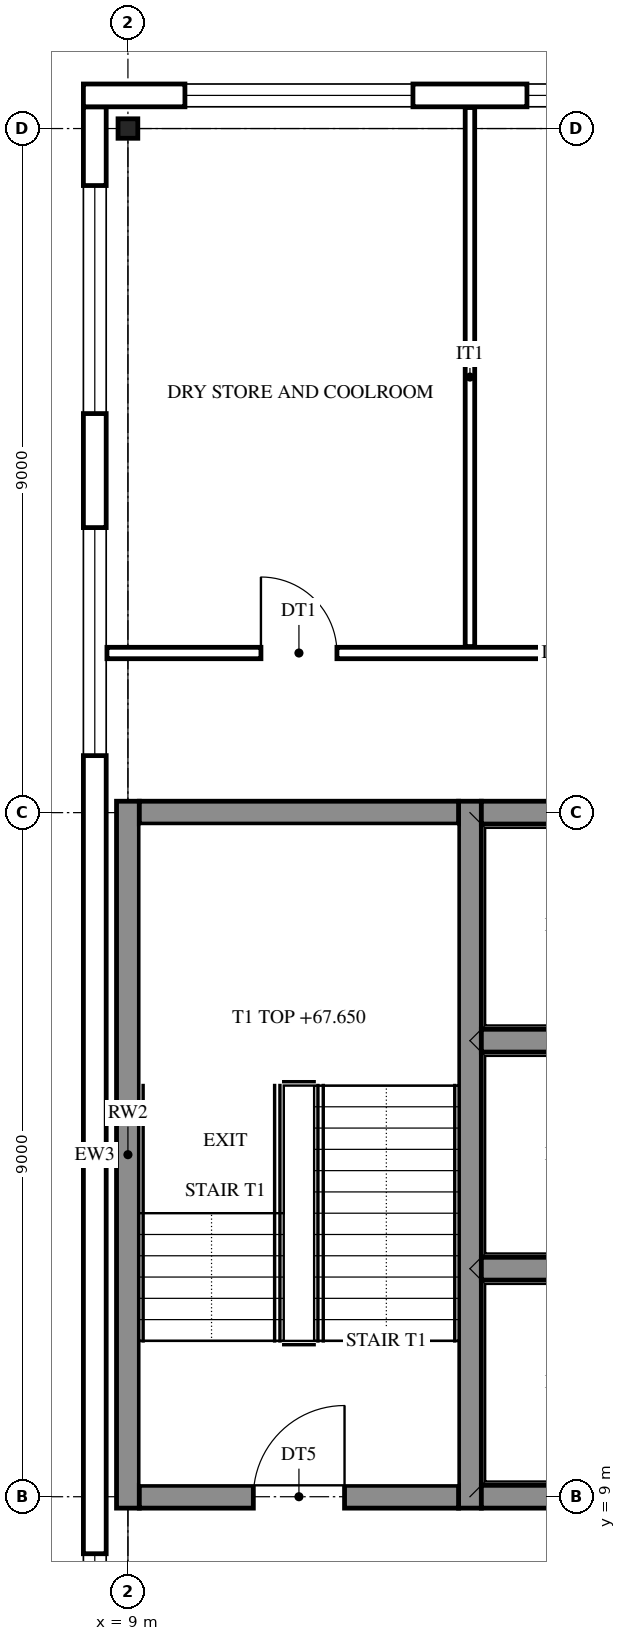
"""IFC4 building model, lengths in metres.
Left out: names, types, materials, properties, quantities, classifications, styles, units other than length and angle.
Written with IfcOpenShell. Run it as: python <this file> out.ifc"""

import sys

from ifc_helpers import new_model, si_unit, direction, frame, frame_2d, origin, origin_2d, place, context, subcontext, project, spatial, rectangle, i_section, extrude, element, fill, save


model = new_model("IFC4")
c1 = context("Model", 3, precision=1e-05, world=origin(), true_north=direction((0.0, 1.0)))
c2 = subcontext(c1, "Body", "Model", "MODEL_VIEW")
j1 = project(units=[si_unit("LENGTHUNIT", "METRE"), si_unit("PLANEANGLEUNIT", "RADIAN")], contexts=[c1])
p1 = place(None, origin())
s1 = spatial("IfcSite", under=j1, at=p1, CompositionType="ELEMENT")
p2 = place(p1, origin())
s2 = spatial("IfcBuilding", under=s1, at=p2, CompositionType="ELEMENT")
p3 = place(p2, frame((0.0, 0.0, 65.4)))
s3 = spatial("IfcBuildingStorey", under=s2, at=p3, CompositionType="ELEMENT", Elevation=65.4)
p4 = place(p3, frame((9.0, 27.0, 0.0), z_axis=(0.0, 0.0, 1.0), x_axis=(0.0, 1.0, 0.0)))
e1 = element("IfcColumn", 1, at=p4, inside=s3, PredefinedType="COLUMN", context=c2, shape_type="SweptSolid", body=[
    extrude(i_section(OverallWidth=0.256, OverallDepth=0.26, WebThickness=0.01, FlangeThickness=0.017, FilletRadius=0.014, at=origin_2d()), origin(), (0.0, 0.0, 1.0), 4.5),
])
for number, where, z_axis, x_axis in (
    (2, (9.0, 8.85, 0.0), (0.0, 0.0, 1.0), (0.0, 1.0, 0.0)),
    (3, (13.5, 8.85, 0.0), (0.0, 0.0, 1.0), (0.0, 1.0, 0.0)),
):
    element("IfcWall", number, at=place(p3, frame(where, z_axis=z_axis, x_axis=x_axis)), inside=s3, PredefinedType="SHEAR", context=c2, shape_type="SweptSolid", body=[
        extrude(rectangle(XDim=9.3, YDim=0.3, at=frame_2d((4.65, 0.0))), origin(), (0.0, 0.0, 1.0), 4.5),
    ])
p5 = place(p3, frame((9.15, 9.0, 0.0), z_axis=(0.0, 0.0, 1.0), x_axis=(1.0, 0.0, 0.0)))
e4 = element("IfcWall", 4, at=p5, inside=s3, PredefinedType="SHEAR", context=c2, shape_type="SweptSolid", body=[
    extrude(rectangle(XDim=4.2, YDim=0.3, at=frame_2d((2.1, 0.0))), origin(), (0.0, 0.0, 1.0), 4.5),
])
p6 = place(p5, frame((1.5, 0.0, 0.0)))
e5 = element("IfcOpeningElement", 5, at=p6, cuts=e4, PredefinedType="OPENING", context=c2, shape_type="SweptSolid", body=[
    extrude(rectangle(XDim=1.2, YDim=2.1, at=frame_2d((0.6, 1.05))), frame((0.0, 0.16, 0.0), z_axis=(0.0, -1.0, 0.0), x_axis=(1.0, 0.0, 0.0)), (0.0, 0.0, 1.0), 0.32),
])
for number, where, z_axis, x_axis in (
    (6, (13.65, 9.0, 0.0), (0.0, 0.0, 1.0), (1.0, 0.0, 0.0)),
    (7, (13.65, 12.0, 0.0), (0.0, 0.0, 1.0), (1.0, 0.0, 0.0)),
    (8, (13.65, 15.0, 0.0), (0.0, 0.0, 1.0), (1.0, 0.0, 0.0)),
):
    element("IfcWall", number, at=place(p3, frame(where, z_axis=z_axis, x_axis=x_axis)), inside=s3, PredefinedType="SHEAR", context=c2, shape_type="SweptSolid", body=[
        extrude(rectangle(XDim=2.7, YDim=0.3, at=frame_2d((1.35, 0.0))), origin(), (0.0, 0.0, 1.0), 4.5),
    ])
p7 = place(p3, frame((9.15, 18.0, 0.0), z_axis=(0.0, 0.0, 1.0), x_axis=(1.0, 0.0, 0.0)))
e9 = element("IfcWall", 9, at=p7, inside=s3, PredefinedType="SHEAR", context=c2, shape_type="SweptSolid", body=[
    extrude(rectangle(XDim=4.2, YDim=0.3, at=frame_2d((2.1, 0.0))), origin(), (0.0, 0.0, 1.0), 4.5),
])
p8 = place(p3, frame((13.65, 18.0, 0.0), z_axis=(0.0, 0.0, 1.0), x_axis=(1.0, 0.0, 0.0)))
e10 = element("IfcWall", 10, at=p8, inside=s3, PredefinedType="SHEAR", context=c2, shape_type="SweptSolid", body=[
    extrude(rectangle(XDim=2.7, YDim=0.3, at=frame_2d((1.35, 0.0))), origin(), (0.0, 0.0, 1.0), 4.5),
])
p9 = place(p3, frame((8.564, -0.286, 0.0), z_axis=(0.0, 0.0, 1.0), x_axis=(0.0, 1.0, 0.0)))
e11 = element("IfcWall", 11, at=p9, inside=s3, PredefinedType="STANDARD", context=c2, shape_type="SweptSolid", body=[
    extrude(rectangle(XDim=27.572, YDim=0.3, at=frame_2d((13.786, 0.0))), origin(), (0.0, 0.0, 1.0), 4.5),
])
p10 = place(p9, frame((1.036, 0.0, 0.6)))
e12 = element("IfcOpeningElement", 12, at=p10, cuts=e11, PredefinedType="OPENING", context=c2, shape_type="SweptSolid", body=[
    extrude(rectangle(XDim=3.0, YDim=3.1, at=frame_2d((1.5, 1.55))), frame((0.0, 0.16, 0.0), z_axis=(0.0, -1.0, 0.0), x_axis=(1.0, 0.0, 0.0)), (0.0, 0.0, 1.0), 0.32),
])
p11 = place(p9, frame((5.536, 0.0, 0.6)))
e13 = element("IfcOpeningElement", 13, at=p11, cuts=e11, PredefinedType="OPENING", context=c2, shape_type="SweptSolid", body=[
    extrude(rectangle(XDim=3.0, YDim=3.1, at=frame_2d((1.5, 1.55))), frame((0.0, 0.16, 0.0), z_axis=(0.0, -1.0, 0.0), x_axis=(1.0, 0.0, 0.0)), (0.0, 0.0, 1.0), 0.32),
])
p12 = place(p9, frame((19.036, 0.0, 0.6)))
e14 = element("IfcOpeningElement", 14, at=p12, cuts=e11, PredefinedType="OPENING", context=c2, shape_type="SweptSolid", body=[
    extrude(rectangle(XDim=3.0, YDim=3.1, at=frame_2d((1.5, 1.55))), frame((0.0, 0.16, 0.0), z_axis=(0.0, -1.0, 0.0), x_axis=(1.0, 0.0, 0.0)), (0.0, 0.0, 1.0), 0.32),
])
p13 = place(p9, frame((23.536, 0.0, 0.6)))
e15 = element("IfcOpeningElement", 15, at=p13, cuts=e11, PredefinedType="OPENING", context=c2, shape_type="SweptSolid", body=[
    extrude(rectangle(XDim=3.0, YDim=3.1, at=frame_2d((1.5, 1.55))), frame((0.0, 0.16, 0.0), z_axis=(0.0, -1.0, 0.0), x_axis=(1.0, 0.0, 0.0)), (0.0, 0.0, 1.0), 0.32),
])
p14 = place(p3, frame((8.414, 27.436, 0.0), z_axis=(0.0, 0.0, 1.0), x_axis=(1.0, 0.0, 0.0)))
e16 = element("IfcWall", 16, at=p14, inside=s3, PredefinedType="STANDARD", context=c2, shape_type="SweptSolid", body=[
    extrude(rectangle(XDim=19.172, YDim=0.3, at=frame_2d((9.586, 0.0))), origin(), (0.0, 0.0, 1.0), 4.5),
])
p15 = place(p14, frame((1.336, 0.0, 0.6)))
e17 = element("IfcOpeningElement", 17, at=p15, cuts=e16, PredefinedType="OPENING", context=c2, shape_type="SweptSolid", body=[
    extrude(rectangle(XDim=3.0, YDim=3.1, at=frame_2d((1.5, 1.55))), frame((0.0, 0.16, 0.0), z_axis=(0.0, -1.0, 0.0), x_axis=(1.0, 0.0, 0.0)), (0.0, 0.0, 1.0), 0.32),
])
p16 = place(p14, frame((5.836, 0.0, 0.6)))
e18 = element("IfcOpeningElement", 18, at=p16, cuts=e16, PredefinedType="OPENING", context=c2, shape_type="SweptSolid", body=[
    extrude(rectangle(XDim=3.0, YDim=3.1, at=frame_2d((1.5, 1.55))), frame((0.0, 0.16, 0.0), z_axis=(0.0, -1.0, 0.0), x_axis=(1.0, 0.0, 0.0)), (0.0, 0.0, 1.0), 0.32),
])
p17 = place(p14, frame((10.336, 0.0, 0.6)))
e19 = element("IfcOpeningElement", 19, at=p17, cuts=e16, PredefinedType="OPENING", context=c2, shape_type="SweptSolid", body=[
    extrude(rectangle(XDim=3.0, YDim=3.1, at=frame_2d((1.5, 1.55))), frame((0.0, 0.16, 0.0), z_axis=(0.0, -1.0, 0.0), x_axis=(1.0, 0.0, 0.0)), (0.0, 0.0, 1.0), 0.32),
])
p18 = place(p14, frame((14.836, 0.0, 0.6)))
e20 = element("IfcOpeningElement", 20, at=p18, cuts=e16, PredefinedType="OPENING", context=c2, shape_type="SweptSolid", body=[
    extrude(rectangle(XDim=3.0, YDim=3.1, at=frame_2d((1.5, 1.55))), frame((0.0, 0.16, 0.0), z_axis=(0.0, -1.0, 0.0), x_axis=(1.0, 0.0, 0.0)), (0.0, 0.0, 1.0), 0.32),
])
p19 = place(p3, frame((13.5, 20.185, 0.0), z_axis=(0.0, 0.0, 1.0), x_axis=(0.0, 1.0, 0.0)))
e21 = element("IfcWall", 21, at=p19, inside=s3, PredefinedType="PARTITIONING", context=c2, shape_type="SweptSolid", body=[
    extrude(rectangle(XDim=7.091, YDim=0.125, at=frame_2d((3.545, 0.0))), origin(), (0.0, 0.0, 1.0), 3.723),
])
p20 = place(p3, frame((8.724, 20.1, 0.0), z_axis=(0.0, 0.0, 1.0), x_axis=(1.0, 0.0, 0.0)))
e22 = element("IfcWall", 22, at=p20, inside=s3, PredefinedType="PARTITIONING", context=c2, shape_type="SweptSolid", body=[
    extrude(rectangle(XDim=18.552, YDim=0.15, at=frame_2d((9.276, 0.0))), origin(), (0.0, 0.0, 1.0), 3.723),
])
p21 = place(p20, frame((2.026, 0.0, 0.0)))
e23 = element("IfcOpeningElement", 23, at=p21, cuts=e22, PredefinedType="OPENING", context=c2, shape_type="SweptSolid", body=[
    extrude(rectangle(XDim=1.0, YDim=2.1, at=frame_2d((0.5, 1.05))), frame((0.0, 0.085, 0.0), z_axis=(0.0, -1.0, 0.0), x_axis=(1.0, 0.0, 0.0)), (0.0, 0.0, 1.0), 0.17),
])
p22 = place(p20, frame((8.776, 0.0, 0.0)))
e24 = element("IfcOpeningElement", 24, at=p22, cuts=e22, PredefinedType="OPENING", context=c2, shape_type="SweptSolid", body=[
    extrude(rectangle(XDim=1.0, YDim=2.1, at=frame_2d((0.5, 1.05))), frame((0.0, 0.085, 0.0), z_axis=(0.0, -1.0, 0.0), x_axis=(1.0, 0.0, 0.0)), (0.0, 0.0, 1.0), 0.17),
])
p23 = place(p20, frame((15.526, 0.0, 0.0)))
e25 = element("IfcOpeningElement", 25, at=p23, cuts=e22, PredefinedType="OPENING", context=c2, shape_type="SweptSolid", body=[
    extrude(rectangle(XDim=1.0, YDim=2.1, at=frame_2d((0.5, 1.05))), frame((0.0, 0.085, 0.0), z_axis=(0.0, -1.0, 0.0), x_axis=(1.0, 0.0, 0.0)), (0.0, 0.0, 1.0), 0.17),
])
p24 = place(p11, origin())
e26 = element("IfcWindow", 26, at=p24, inside=s3, PartitioningType="SINGLE_PANEL", PredefinedType="WINDOW", context=c2, shape_type="SweptSolid", body=[
    extrude(rectangle(XDim=3.0, YDim=3.1, at=frame_2d((1.5, 1.55))), frame((0.0, 0.03, 0.0), z_axis=(0.0, -1.0, 0.0), x_axis=(1.0, 0.0, 0.0)), (0.0, 0.0, 1.0), 0.06),
])
fill(e13, e26)
p25 = place(p12, origin())
e27 = element("IfcWindow", 27, at=p25, inside=s3, PartitioningType="SINGLE_PANEL", PredefinedType="WINDOW", context=c2, shape_type="SweptSolid", body=[
    extrude(rectangle(XDim=3.0, YDim=3.1, at=frame_2d((1.5, 1.55))), frame((0.0, 0.03, 0.0), z_axis=(0.0, -1.0, 0.0), x_axis=(1.0, 0.0, 0.0)), (0.0, 0.0, 1.0), 0.06),
])
fill(e14, e27)
p26 = place(p13, origin())
e28 = element("IfcWindow", 28, at=p26, inside=s3, PartitioningType="SINGLE_PANEL", PredefinedType="WINDOW", context=c2, shape_type="SweptSolid", body=[
    extrude(rectangle(XDim=3.0, YDim=3.1, at=frame_2d((1.5, 1.55))), frame((0.0, 0.03, 0.0), z_axis=(0.0, -1.0, 0.0), x_axis=(1.0, 0.0, 0.0)), (0.0, 0.0, 1.0), 0.06),
])
fill(e15, e28)
p27 = place(p15, origin())
e29 = element("IfcWindow", 29, at=p27, inside=s3, PartitioningType="SINGLE_PANEL", PredefinedType="WINDOW", context=c2, shape_type="SweptSolid", body=[
    extrude(rectangle(XDim=3.0, YDim=3.1, at=frame_2d((1.5, 1.55))), frame((0.0, 0.03, 0.0), z_axis=(0.0, -1.0, 0.0), x_axis=(1.0, 0.0, 0.0)), (0.0, 0.0, 1.0), 0.06),
])
fill(e17, e29)
p28 = place(p16, origin())
e30 = element("IfcWindow", 30, at=p28, inside=s3, PartitioningType="SINGLE_PANEL", PredefinedType="WINDOW", context=c2, shape_type="SweptSolid", body=[
    extrude(rectangle(XDim=3.0, YDim=3.1, at=frame_2d((1.5, 1.55))), frame((0.0, 0.03, 0.0), z_axis=(0.0, -1.0, 0.0), x_axis=(1.0, 0.0, 0.0)), (0.0, 0.0, 1.0), 0.06),
])
fill(e18, e30)
p29 = place(p6, origin())
e31 = element("IfcDoor", 31, at=p29, inside=s3, OperationType="SINGLE_SWING_RIGHT", PredefinedType="DOOR", context=c2, shape_type="SweptSolid", body=[
    extrude(rectangle(XDim=1.2, YDim=2.1, at=frame_2d((0.6, 1.05))), frame((0.0, 0.025, 0.0), z_axis=(0.0, -1.0, 0.0), x_axis=(1.0, 0.0, 0.0)), (0.0, 0.0, 1.0), 0.05),
])
fill(e5, e31)
p30 = place(p21, origin())
e32 = element("IfcDoor", 32, at=p30, inside=s3, OperationType="SINGLE_SWING_LEFT", PredefinedType="DOOR", context=c2, shape_type="SweptSolid", body=[
    extrude(rectangle(XDim=1.0, YDim=2.1, at=frame_2d((0.5, 1.05))), frame((0.0, 0.025, 0.0), z_axis=(0.0, -1.0, 0.0), x_axis=(1.0, 0.0, 0.0)), (0.0, 0.0, 1.0), 0.05),
])
fill(e23, e32)
save(model, sys.argv[1])
